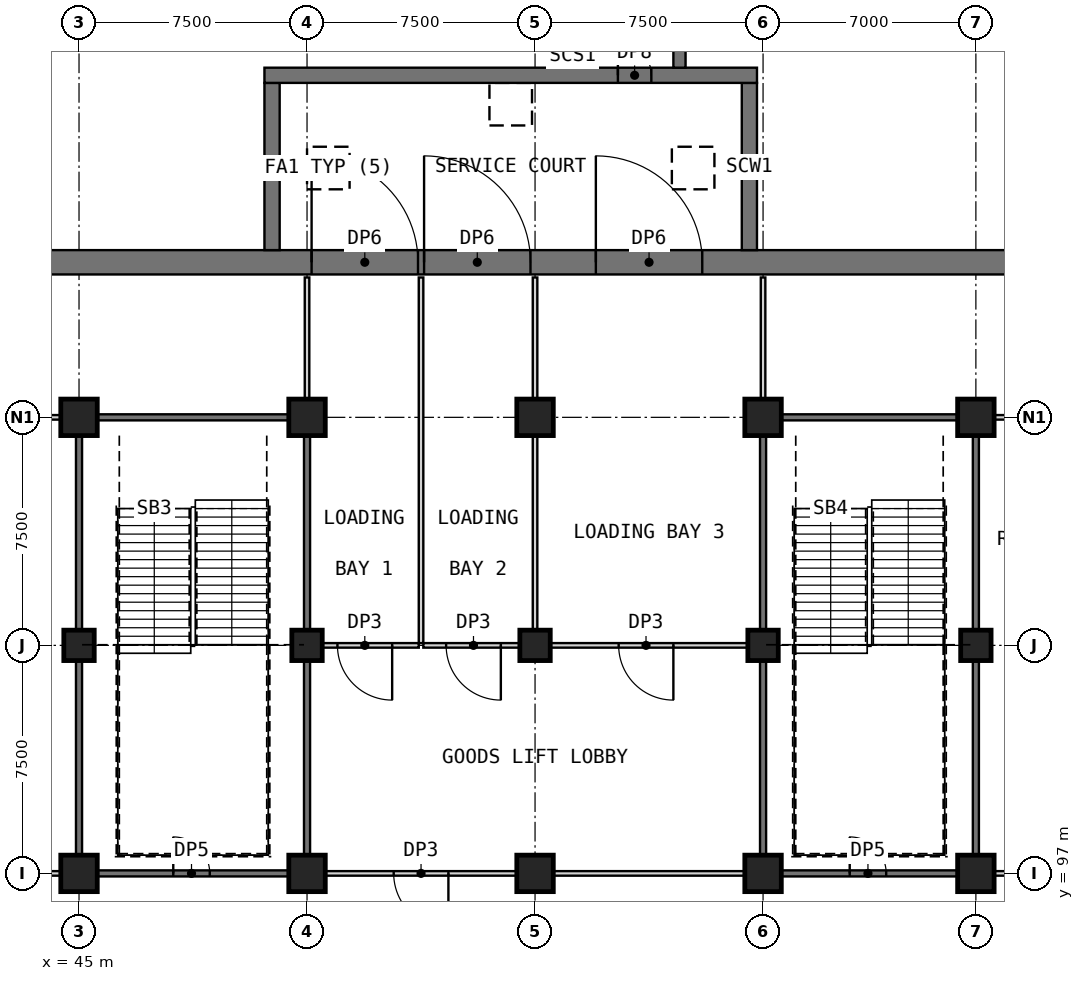
"""IFC4 building model, lengths in metres.
Left out: names, types, materials, properties, quantities, classifications, styles, units other than length and angle.
Written with IfcOpenShell. Run it as: python <this file> out.ifc"""

import sys

from ifc_helpers import new_model, si_unit, direction, frame, frame_2d, origin, origin_2d, place, context, subcontext, project, spatial, rectangle, extrude, element, fill, save


model = new_model("IFC4")
c1 = context("Model", 3, precision=1e-05, world=origin(), true_north=direction((0.0, 1.0)))
c2 = subcontext(c1, "Body", "Model", "MODEL_VIEW")
j1 = project(units=[si_unit("LENGTHUNIT", "METRE"), si_unit("PLANEANGLEUNIT", "RADIAN")], contexts=[c1])
p1 = place(None, origin())
s1 = spatial("IfcSite", under=j1, at=p1, CompositionType="ELEMENT")
p2 = place(p1, origin())
s2 = spatial("IfcBuilding", under=s1, at=p2, CompositionType="ELEMENT")
p3 = place(p2, frame((0.0, 0.0, -6.0)))
s3 = spatial("IfcBuildingStorey", under=s2, at=p3, CompositionType="ELEMENT", Elevation=-6.0)
p4 = place(p3, frame((10.4, 117.1, 0.0), z_axis=(0.0, 0.0, 1.0), x_axis=(1.0, 0.0, 0.0)))
e1 = element("IfcWall", 1, at=p4, inside=s3, PredefinedType="SHEAR", context=c2, shape_type="SweptSolid", body=[
    extrude(rectangle(XDim=80.0, YDim=0.8, at=frame_2d((40.0, 0.0))), origin(), (0.0, 0.0, 1.0), 6.0),
])
p5 = place(p4, frame((42.25, 0.0, 0.0)))
e2 = element("IfcOpeningElement", 2, at=p5, cuts=e1, PredefinedType="OPENING", context=c2, shape_type="SweptSolid", body=[
    extrude(rectangle(XDim=3.5, YDim=4.5, at=frame_2d((1.75, 2.25))), frame((0.0, 0.41, 0.0), z_axis=(0.0, -1.0, 0.0), x_axis=(1.0, 0.0, 0.0)), (0.0, 0.0, 1.0), 0.82),
])
p6 = place(p4, frame((45.95, 0.0, 0.0)))
e3 = element("IfcOpeningElement", 3, at=p6, cuts=e1, PredefinedType="OPENING", context=c2, shape_type="SweptSolid", body=[
    extrude(rectangle(XDim=3.5, YDim=4.5, at=frame_2d((1.75, 2.25))), frame((0.0, 0.41, 0.0), z_axis=(0.0, -1.0, 0.0), x_axis=(1.0, 0.0, 0.0)), (0.0, 0.0, 1.0), 0.82),
])
p7 = place(p4, frame((51.6, 0.0, 0.0)))
e4 = element("IfcOpeningElement", 4, at=p7, cuts=e1, PredefinedType="OPENING", context=c2, shape_type="SweptSolid", body=[
    extrude(rectangle(XDim=3.5, YDim=4.5, at=frame_2d((1.75, 2.25))), frame((0.0, 0.41, 0.0), z_axis=(0.0, -1.0, 0.0), x_axis=(1.0, 0.0, 0.0)), (0.0, 0.0, 1.0), 0.82),
])
p8 = place(p3, frame((45.0, 97.0, 0.0), z_axis=(0.0, 0.0, 1.0), x_axis=(1.0, 0.0, 0.0)))
e5 = element("IfcColumn", 5, at=p8, inside=s3, PredefinedType="COLUMN", context=c2, shape_type="SweptSolid", body=[
    extrude(rectangle(XDim=1.2, YDim=1.2, at=origin_2d()), origin(), (0.0, 0.0, 1.0), 6.0),
])
p9 = place(p3, frame((45.0, 104.5, 0.0), z_axis=(0.0, 0.0, 1.0), x_axis=(1.0, 0.0, 0.0)))
e6 = element("IfcColumn", 6, at=p9, inside=s3, PredefinedType="COLUMN", context=c2, shape_type="SweptSolid", body=[
    extrude(rectangle(XDim=1.0, YDim=1.0, at=origin_2d()), origin(), (0.0, 0.0, 1.0), 6.0),
])
p10 = place(p3, frame((52.5, 97.0, 0.0), z_axis=(0.0, 0.0, 1.0), x_axis=(1.0, 0.0, 0.0)))
e7 = element("IfcColumn", 7, at=p10, inside=s3, PredefinedType="COLUMN", context=c2, shape_type="SweptSolid", body=[
    extrude(rectangle(XDim=1.2, YDim=1.2, at=origin_2d()), origin(), (0.0, 0.0, 1.0), 6.0),
])
p11 = place(p3, frame((52.5, 104.5, 0.0), z_axis=(0.0, 0.0, 1.0), x_axis=(1.0, 0.0, 0.0)))
e8 = element("IfcColumn", 8, at=p11, inside=s3, PredefinedType="COLUMN", context=c2, shape_type="SweptSolid", body=[
    extrude(rectangle(XDim=1.0, YDim=1.0, at=origin_2d()), origin(), (0.0, 0.0, 1.0), 6.0),
])
p12 = place(p3, frame((60.0, 97.0, 0.0), z_axis=(0.0, 0.0, 1.0), x_axis=(1.0, 0.0, 0.0)))
e9 = element("IfcColumn", 9, at=p12, inside=s3, PredefinedType="COLUMN", context=c2, shape_type="SweptSolid", body=[
    extrude(rectangle(XDim=1.2, YDim=1.2, at=origin_2d()), origin(), (0.0, 0.0, 1.0), 6.0),
])
p13 = place(p3, frame((60.0, 104.5, 0.0), z_axis=(0.0, 0.0, 1.0), x_axis=(1.0, 0.0, 0.0)))
e10 = element("IfcColumn", 10, at=p13, inside=s3, PredefinedType="COLUMN", context=c2, shape_type="SweptSolid", body=[
    extrude(rectangle(XDim=1.0, YDim=1.0, at=origin_2d()), origin(), (0.0, 0.0, 1.0), 6.0),
])
p14 = place(p3, frame((67.5, 97.0, 0.0), z_axis=(0.0, 0.0, 1.0), x_axis=(1.0, 0.0, 0.0)))
e11 = element("IfcColumn", 11, at=p14, inside=s3, PredefinedType="COLUMN", context=c2, shape_type="SweptSolid", body=[
    extrude(rectangle(XDim=1.2, YDim=1.2, at=origin_2d()), origin(), (0.0, 0.0, 1.0), 6.0),
])
p15 = place(p3, frame((67.5, 104.5, 0.0), z_axis=(0.0, 0.0, 1.0), x_axis=(1.0, 0.0, 0.0)))
e12 = element("IfcColumn", 12, at=p15, inside=s3, PredefinedType="COLUMN", context=c2, shape_type="SweptSolid", body=[
    extrude(rectangle(XDim=1.0, YDim=1.0, at=origin_2d()), origin(), (0.0, 0.0, 1.0), 6.0),
])
p16 = place(p3, frame((74.5, 97.0, 0.0), z_axis=(0.0, 0.0, 1.0), x_axis=(1.0, 0.0, 0.0)))
e13 = element("IfcColumn", 13, at=p16, inside=s3, PredefinedType="COLUMN", context=c2, shape_type="SweptSolid", body=[
    extrude(rectangle(XDim=1.2, YDim=1.2, at=origin_2d()), origin(), (0.0, 0.0, 1.0), 6.0),
])
p17 = place(p3, frame((74.5, 104.5, 0.0), z_axis=(0.0, 0.0, 1.0), x_axis=(1.0, 0.0, 0.0)))
e14 = element("IfcColumn", 14, at=p17, inside=s3, PredefinedType="COLUMN", context=c2, shape_type="SweptSolid", body=[
    extrude(rectangle(XDim=1.0, YDim=1.0, at=origin_2d()), origin(), (0.0, 0.0, 1.0), 6.0),
])
for number, where, z_axis, x_axis in (
    (15, (45.0, 112.0, 0.0), (0.0, 0.0, 1.0), (1.0, 0.0, 0.0)),
    (16, (52.5, 112.0, 0.0), (0.0, 0.0, 1.0), (1.0, 0.0, 0.0)),
    (17, (60.0, 112.0, 0.0), (0.0, 0.0, 1.0), (1.0, 0.0, 0.0)),
    (18, (67.5, 112.0, 0.0), (0.0, 0.0, 1.0), (1.0, 0.0, 0.0)),
    (19, (74.5, 112.0, 0.0), (0.0, 0.0, 1.0), (1.0, 0.0, 0.0)),
):
    element("IfcColumn", number, at=place(p3, frame(where, z_axis=z_axis, x_axis=x_axis)), inside=s3, PredefinedType="COLUMN", context=c2, shape_type="SweptSolid", body=[
        extrude(rectangle(XDim=1.2, YDim=1.2, at=origin_2d()), origin(), (0.0, 0.0, 1.0), 6.0),
    ])
p18 = place(p3, frame((44.4, 97.0, 0.0), z_axis=(0.0, 0.0, 1.0), x_axis=(-1.0, 0.0, 0.0)))
e20 = element("IfcWall", 20, at=p18, inside=s3, PredefinedType="PARTITIONING", context=c2, shape_type="SweptSolid", body=[
    extrude(rectangle(XDim=6.3, YDim=0.15, at=frame_2d((3.15, 0.0))), origin(), (0.0, 0.0, 1.0), 5.7),
])
p19 = place(p18, frame((2.55, 0.0, 0.0)))
e21 = element("IfcOpeningElement", 21, at=p19, cuts=e20, PredefinedType="OPENING", context=c2, shape_type="SweptSolid", body=[
    extrude(rectangle(XDim=1.0, YDim=2.1, at=frame_2d((0.5, 1.05))), frame((0.0, 0.085, 0.0), z_axis=(0.0, -1.0, 0.0), x_axis=(1.0, 0.0, 0.0)), (0.0, 0.0, 1.0), 0.17),
])
p20 = place(p3, frame((45.6, 97.0, 0.0), z_axis=(0.0, 0.0, 1.0), x_axis=(1.0, 0.0, 0.0)))
e22 = element("IfcWall", 22, at=p20, inside=s3, PredefinedType="SHEAR", context=c2, shape_type="SweptSolid", body=[
    extrude(rectangle(XDim=6.3, YDim=0.2, at=frame_2d((3.15, 0.0))), origin(), (0.0, 0.0, 1.0), 5.7),
])
p21 = place(p20, frame((2.5, 0.0, 0.0)))
e23 = element("IfcOpeningElement", 23, at=p21, cuts=e22, PredefinedType="OPENING", context=c2, shape_type="SweptSolid", body=[
    extrude(rectangle(XDim=1.2, YDim=2.1, at=frame_2d((0.6, 1.05))), frame((0.0, 0.11, 0.0), z_axis=(0.0, -1.0, 0.0), x_axis=(1.0, 0.0, 0.0)), (0.0, 0.0, 1.0), 0.22),
])
p22 = place(p3, frame((59.4, 97.0, 0.0), z_axis=(0.0, 0.0, 1.0), x_axis=(-1.0, 0.0, 0.0)))
e24 = element("IfcWall", 24, at=p22, inside=s3, PredefinedType="PARTITIONING", context=c2, shape_type="SweptSolid", body=[
    extrude(rectangle(XDim=6.3, YDim=0.15, at=frame_2d((3.15, 0.0))), origin(), (0.0, 0.0, 1.0), 5.7),
])
p23 = place(p22, frame((2.25, 0.0, 0.0)))
e25 = element("IfcOpeningElement", 25, at=p23, cuts=e24, PredefinedType="OPENING", context=c2, shape_type="SweptSolid", body=[
    extrude(rectangle(XDim=1.8, YDim=2.4, at=frame_2d((0.9, 1.2))), frame((0.0, 0.085, 0.0), z_axis=(0.0, -1.0, 0.0), x_axis=(1.0, 0.0, 0.0)), (0.0, 0.0, 1.0), 0.17),
])
p24 = place(p3, frame((60.6, 97.0, 0.0), z_axis=(0.0, 0.0, 1.0), x_axis=(1.0, 0.0, 0.0)))
e26 = element("IfcWall", 26, at=p24, inside=s3, PredefinedType="PARTITIONING", context=c2, shape_type="SweptSolid", body=[
    extrude(rectangle(XDim=6.3, YDim=0.15, at=frame_2d((3.15, 0.0))), origin(), (0.0, 0.0, 1.0), 5.7),
])
p25 = place(p3, frame((68.1, 97.0, 0.0), z_axis=(0.0, 0.0, 1.0), x_axis=(1.0, 0.0, 0.0)))
e27 = element("IfcWall", 27, at=p25, inside=s3, PredefinedType="SHEAR", context=c2, shape_type="SweptSolid", body=[
    extrude(rectangle(XDim=5.8, YDim=0.2, at=frame_2d((2.9, 0.0))), origin(), (0.0, 0.0, 1.0), 5.7),
])
p26 = place(p25, frame((2.25, 0.0, 0.0)))
e28 = element("IfcOpeningElement", 28, at=p26, cuts=e27, PredefinedType="OPENING", context=c2, shape_type="SweptSolid", body=[
    extrude(rectangle(XDim=1.2, YDim=2.1, at=frame_2d((0.6, 1.05))), frame((0.0, 0.11, 0.0), z_axis=(0.0, -1.0, 0.0), x_axis=(1.0, 0.0, 0.0)), (0.0, 0.0, 1.0), 0.22),
])
p27 = place(p3, frame((81.4, 97.0, 0.0), z_axis=(0.0, 0.0, 1.0), x_axis=(-1.0, 0.0, 0.0)))
e29 = element("IfcWall", 29, at=p27, inside=s3, PredefinedType="PARTITIONING", context=c2, shape_type="SweptSolid", body=[
    extrude(rectangle(XDim=6.3, YDim=0.15, at=frame_2d((3.15, 0.0))), origin(), (0.0, 0.0, 1.0), 5.7),
])
p28 = place(p27, frame((2.55, 0.0, 0.0)))
e30 = element("IfcOpeningElement", 30, at=p28, cuts=e29, PredefinedType="OPENING", context=c2, shape_type="SweptSolid", body=[
    extrude(rectangle(XDim=1.0, YDim=2.1, at=frame_2d((0.5, 1.05))), frame((0.0, 0.085, 0.0), z_axis=(0.0, -1.0, 0.0), x_axis=(1.0, 0.0, 0.0)), (0.0, 0.0, 1.0), 0.17),
])
p29 = place(p3, frame((38.1, 112.0, 0.0), z_axis=(0.0, 0.0, 1.0), x_axis=(1.0, 0.0, 0.0)))
e31 = element("IfcWall", 31, at=p29, inside=s3, PredefinedType="PARTITIONING", context=c2, shape_type="SweptSolid", body=[
    extrude(rectangle(XDim=6.3, YDim=0.15, at=frame_2d((3.15, 0.0))), origin(), (0.0, 0.0, 1.0), 5.1),
])
p30 = place(p3, frame((45.6, 112.0, 0.0), z_axis=(0.0, 0.0, 1.0), x_axis=(1.0, 0.0, 0.0)))
e32 = element("IfcWall", 32, at=p30, inside=s3, PredefinedType="SHEAR", context=c2, shape_type="SweptSolid", body=[
    extrude(rectangle(XDim=6.3, YDim=0.2, at=frame_2d((3.15, 0.0))), origin(), (0.0, 0.0, 1.0), 5.1),
])
p31 = place(p3, frame((68.1, 112.0, 0.0), z_axis=(0.0, 0.0, 1.0), x_axis=(1.0, 0.0, 0.0)))
e33 = element("IfcWall", 33, at=p31, inside=s3, PredefinedType="SHEAR", context=c2, shape_type="SweptSolid", body=[
    extrude(rectangle(XDim=5.8, YDim=0.2, at=frame_2d((2.9, 0.0))), origin(), (0.0, 0.0, 1.0), 5.1),
])
p32 = place(p3, frame((75.1, 112.0, 0.0), z_axis=(0.0, 0.0, 1.0), x_axis=(1.0, 0.0, 0.0)))
e34 = element("IfcWall", 34, at=p32, inside=s3, PredefinedType="PARTITIONING", context=c2, shape_type="SweptSolid", body=[
    extrude(rectangle(XDim=6.3, YDim=0.15, at=frame_2d((3.15, 0.0))), origin(), (0.0, 0.0, 1.0), 5.1),
])
p33 = place(p3, frame((56.175, 104.5, 0.0), z_axis=(0.0, 0.0, 1.0), x_axis=(-1.0, 0.0, 0.0)))
e35 = element("IfcWall", 35, at=p33, inside=s3, PredefinedType="PARTITIONING", context=c2, shape_type="SweptSolid", body=[
    extrude(rectangle(XDim=3.175, YDim=0.15, at=frame_2d((1.587, 0.0))), origin(), (0.0, 0.0, 1.0), 5.7),
])
p34 = place(p33, frame((0.875, 0.0, 0.0)))
e36 = element("IfcOpeningElement", 36, at=p34, cuts=e35, PredefinedType="OPENING", context=c2, shape_type="SweptSolid", body=[
    extrude(rectangle(XDim=1.8, YDim=2.4, at=frame_2d((0.9, 1.2))), frame((0.0, 0.085, 0.0), z_axis=(0.0, -1.0, 0.0), x_axis=(1.0, 0.0, 0.0)), (0.0, 0.0, 1.0), 0.17),
])
p35 = place(p3, frame((59.5, 104.5, 0.0), z_axis=(0.0, 0.0, 1.0), x_axis=(-1.0, 0.0, 0.0)))
e37 = element("IfcWall", 37, at=p35, inside=s3, PredefinedType="PARTITIONING", context=c2, shape_type="SweptSolid", body=[
    extrude(rectangle(XDim=3.175, YDim=0.15, at=frame_2d((1.587, 0.0))), origin(), (0.0, 0.0, 1.0), 5.7),
])
p36 = place(p35, frame((0.625, 0.0, 0.0)))
e38 = element("IfcOpeningElement", 38, at=p36, cuts=e37, PredefinedType="OPENING", context=c2, shape_type="SweptSolid", body=[
    extrude(rectangle(XDim=1.8, YDim=2.4, at=frame_2d((0.9, 1.2))), frame((0.0, 0.085, 0.0), z_axis=(0.0, -1.0, 0.0), x_axis=(1.0, 0.0, 0.0)), (0.0, 0.0, 1.0), 0.17),
])
p37 = place(p3, frame((67.0, 104.5, 0.0), z_axis=(0.0, 0.0, 1.0), x_axis=(-1.0, 0.0, 0.0)))
e39 = element("IfcWall", 39, at=p37, inside=s3, PredefinedType="PARTITIONING", context=c2, shape_type="SweptSolid", body=[
    extrude(rectangle(XDim=6.5, YDim=0.15, at=frame_2d((3.25, 0.0))), origin(), (0.0, 0.0, 1.0), 5.7),
])
p38 = place(p37, frame((2.45, 0.0, 0.0)))
e40 = element("IfcOpeningElement", 40, at=p38, cuts=e39, PredefinedType="OPENING", context=c2, shape_type="SweptSolid", body=[
    extrude(rectangle(XDim=1.8, YDim=2.4, at=frame_2d((0.9, 1.2))), frame((0.0, 0.085, 0.0), z_axis=(0.0, -1.0, 0.0), x_axis=(1.0, 0.0, 0.0)), (0.0, 0.0, 1.0), 0.17),
])
for number, where, z_axis, x_axis in (
    (41, (45.0, 97.6, 0.0), (0.0, 0.0, 1.0), (0.0, 1.0, 0.0)),
    (42, (45.0, 105.0, 0.0), (0.0, 0.0, 1.0), (0.0, 1.0, 0.0)),
    (43, (52.5, 97.6, 0.0), (0.0, 0.0, 1.0), (0.0, 1.0, 0.0)),
    (44, (52.5, 105.0, 0.0), (0.0, 0.0, 1.0), (0.0, 1.0, 0.0)),
):
    element("IfcWall", number, at=place(p3, frame(where, z_axis=z_axis, x_axis=x_axis)), inside=s3, PredefinedType="SHEAR", context=c2, shape_type="SweptSolid", body=[
        extrude(rectangle(XDim=6.4, YDim=0.2, at=frame_2d((3.2, 0.0))), origin(), (0.0, 0.0, 1.0), 5.7),
    ])
p39 = place(p3, frame((52.5, 112.6, 0.0), z_axis=(0.0, 0.0, 1.0), x_axis=(0.0, 1.0, 0.0)))
e45 = element("IfcWall", 45, at=p39, inside=s3, PredefinedType="PARTITIONING", context=c2, shape_type="SweptSolid", body=[
    extrude(rectangle(XDim=4.0, YDim=0.15, at=frame_2d((2.0, 0.0))), origin(), (0.0, 0.0, 1.0), 5.7),
])
for number, where, z_axis, x_axis in (
    (46, (67.5, 97.6, 0.0), (0.0, 0.0, 1.0), (0.0, 1.0, 0.0)),
    (47, (67.5, 105.0, 0.0), (0.0, 0.0, 1.0), (0.0, 1.0, 0.0)),
):
    element("IfcWall", number, at=place(p3, frame(where, z_axis=z_axis, x_axis=x_axis)), inside=s3, PredefinedType="SHEAR", context=c2, shape_type="SweptSolid", body=[
        extrude(rectangle(XDim=6.4, YDim=0.2, at=frame_2d((3.2, 0.0))), origin(), (0.0, 0.0, 1.0), 5.7),
    ])
p40 = place(p3, frame((67.5, 112.6, 0.0), z_axis=(0.0, 0.0, 1.0), x_axis=(0.0, 1.0, 0.0)))
e48 = element("IfcWall", 48, at=p40, inside=s3, PredefinedType="PARTITIONING", context=c2, shape_type="SweptSolid", body=[
    extrude(rectangle(XDim=4.0, YDim=0.15, at=frame_2d((2.0, 0.0))), origin(), (0.0, 0.0, 1.0), 5.7),
])
for number, where, z_axis, x_axis in (
    (49, (74.5, 97.6, 0.0), (0.0, 0.0, 1.0), (0.0, 1.0, 0.0)),
    (50, (74.5, 105.0, 0.0), (0.0, 0.0, 1.0), (0.0, 1.0, 0.0)),
):
    element("IfcWall", number, at=place(p3, frame(where, z_axis=z_axis, x_axis=x_axis)), inside=s3, PredefinedType="SHEAR", context=c2, shape_type="SweptSolid", body=[
        extrude(rectangle(XDim=6.4, YDim=0.2, at=frame_2d((3.2, 0.0))), origin(), (0.0, 0.0, 1.0), 5.7),
    ])
p41 = place(p3, frame((60.0, 105.0, 0.0), z_axis=(0.0, 0.0, 1.0), x_axis=(0.0, 1.0, 0.0)))
e51 = element("IfcWall", 51, at=p41, inside=s3, PredefinedType="PARTITIONING", context=c2, shape_type="SweptSolid", body=[
    extrude(rectangle(XDim=6.4, YDim=0.15, at=frame_2d((3.2, 0.0))), origin(), (0.0, 0.0, 1.0), 5.7),
])
p42 = place(p3, frame((60.0, 112.6, 0.0), z_axis=(0.0, 0.0, 1.0), x_axis=(0.0, 1.0, 0.0)))
e52 = element("IfcWall", 52, at=p42, inside=s3, PredefinedType="PARTITIONING", context=c2, shape_type="SweptSolid", body=[
    extrude(rectangle(XDim=4.0, YDim=0.15, at=frame_2d((2.0, 0.0))), origin(), (0.0, 0.0, 1.0), 5.7),
])
p43 = place(p3, frame((56.25, 104.575, 0.0), z_axis=(0.0, 0.0, 1.0), x_axis=(0.0, 1.0, 0.0)))
e53 = element("IfcWall", 53, at=p43, inside=s3, PredefinedType="PARTITIONING", context=c2, shape_type="SweptSolid", body=[
    extrude(rectangle(XDim=12.025, YDim=0.15, at=frame_2d((6.013, 0.0))), origin(), (0.0, 0.0, 1.0), 5.1),
])
for number, where, z_axis, x_axis in (
    (54, (51.35, 117.5, 0.0), (0.0, 0.0, 1.0), (0.0, 1.0, 0.0)),
    (55, (67.05, 117.5, 0.0), (0.0, 0.0, 1.0), (0.0, 1.0, 0.0)),
):
    element("IfcWall", number, at=place(p3, frame(where, z_axis=z_axis, x_axis=x_axis)), inside=s3, PredefinedType="SHEAR", context=c2, shape_type="SweptSolid", body=[
        extrude(rectangle(XDim=5.5, YDim=0.5, at=frame_2d((2.75, 0.0))), origin(), (0.0, 0.0, 1.0), 6.0),
    ])
p44 = place(p3, frame((51.1, 123.25, 0.0), z_axis=(0.0, 0.0, 1.0), x_axis=(1.0, 0.0, 0.0)))
e56 = element("IfcWall", 56, at=p44, inside=s3, PredefinedType="SHEAR", context=c2, shape_type="SweptSolid", body=[
    extrude(rectangle(XDim=16.2, YDim=0.5, at=frame_2d((8.1, 0.0))), origin(), (0.0, 0.0, 1.0), 6.0),
])
p45 = place(p44, frame((11.625, 0.0, 0.0)))
e57 = element("IfcOpeningElement", 57, at=p45, cuts=e56, PredefinedType="OPENING", context=c2, shape_type="SweptSolid", body=[
    extrude(rectangle(XDim=1.1, YDim=2.1, at=frame_2d((0.55, 1.05))), frame((0.0, 0.26, 0.0), z_axis=(0.0, -1.0, 0.0), x_axis=(1.0, 0.0, 0.0)), (0.0, 0.0, 1.0), 0.52),
])
for number, where, z_axis, x_axis in (
    (58, (61.8, 123.5, 0.0), (0.0, 0.0, 1.0), (0.0, 1.0, 0.0)),
    (59, (64.75, 123.5, 0.0), (0.0, 0.0, 1.0), (0.0, 1.0, 0.0)),
):
    element("IfcWall", number, at=place(p3, frame(where, z_axis=z_axis, x_axis=x_axis)), inside=s3, PredefinedType="SHEAR", context=c2, shape_type="SweptSolid", body=[
        extrude(rectangle(XDim=7.56, YDim=0.4, at=frame_2d((3.78, 0.0))), origin(), (0.0, 0.0, 1.0), 6.0),
    ])
p46 = place(p21, origin())
e60 = element("IfcDoor", 60, at=p46, inside=s3, OperationType="SINGLE_SWING_LEFT", PredefinedType="DOOR", context=c2, shape_type="SweptSolid", body=[
    extrude(rectangle(XDim=1.2, YDim=2.1, at=frame_2d((0.6, 1.05))), frame((0.0, 0.025, 0.0), z_axis=(0.0, -1.0, 0.0), x_axis=(1.0, 0.0, 0.0)), (0.0, 0.0, 1.0), 0.05),
])
fill(e23, e60)
p47 = place(p23, origin())
e61 = element("IfcDoor", 61, at=p47, inside=s3, OperationType="SINGLE_SWING_LEFT", PredefinedType="DOOR", context=c2, shape_type="SweptSolid", body=[
    extrude(rectangle(XDim=1.8, YDim=2.4, at=frame_2d((0.9, 1.2))), frame((0.0, 0.025, 0.0), z_axis=(0.0, -1.0, 0.0), x_axis=(1.0, 0.0, 0.0)), (0.0, 0.0, 1.0), 0.05),
])
fill(e25, e61)
p48 = place(p26, origin())
e62 = element("IfcDoor", 62, at=p48, inside=s3, OperationType="SINGLE_SWING_LEFT", PredefinedType="DOOR", context=c2, shape_type="SweptSolid", body=[
    extrude(rectangle(XDim=1.2, YDim=2.1, at=frame_2d((0.6, 1.05))), frame((0.0, 0.025, 0.0), z_axis=(0.0, -1.0, 0.0), x_axis=(1.0, 0.0, 0.0)), (0.0, 0.0, 1.0), 0.05),
])
fill(e28, e62)
p49 = place(p34, origin())
e63 = element("IfcDoor", 63, at=p49, inside=s3, OperationType="SINGLE_SWING_LEFT", PredefinedType="DOOR", context=c2, shape_type="SweptSolid", body=[
    extrude(rectangle(XDim=1.8, YDim=2.4, at=frame_2d((0.9, 1.2))), frame((0.0, 0.025, 0.0), z_axis=(0.0, -1.0, 0.0), x_axis=(1.0, 0.0, 0.0)), (0.0, 0.0, 1.0), 0.05),
])
fill(e36, e63)
p50 = place(p36, origin())
e64 = element("IfcDoor", 64, at=p50, inside=s3, OperationType="SINGLE_SWING_LEFT", PredefinedType="DOOR", context=c2, shape_type="SweptSolid", body=[
    extrude(rectangle(XDim=1.8, YDim=2.4, at=frame_2d((0.9, 1.2))), frame((0.0, 0.025, 0.0), z_axis=(0.0, -1.0, 0.0), x_axis=(1.0, 0.0, 0.0)), (0.0, 0.0, 1.0), 0.05),
])
fill(e38, e64)
p51 = place(p38, origin())
e65 = element("IfcDoor", 65, at=p51, inside=s3, OperationType="SINGLE_SWING_LEFT", PredefinedType="DOOR", context=c2, shape_type="SweptSolid", body=[
    extrude(rectangle(XDim=1.8, YDim=2.4, at=frame_2d((0.9, 1.2))), frame((0.0, 0.025, 0.0), z_axis=(0.0, -1.0, 0.0), x_axis=(1.0, 0.0, 0.0)), (0.0, 0.0, 1.0), 0.05),
])
fill(e40, e65)
p52 = place(p5, origin())
e66 = element("IfcDoor", 66, at=p52, inside=s3, OperationType="SINGLE_SWING_LEFT", PredefinedType="DOOR", context=c2, shape_type="SweptSolid", body=[
    extrude(rectangle(XDim=3.5, YDim=4.5, at=frame_2d((1.75, 2.25))), frame((0.0, 0.025, 0.0), z_axis=(0.0, -1.0, 0.0), x_axis=(1.0, 0.0, 0.0)), (0.0, 0.0, 1.0), 0.05),
])
fill(e2, e66)
p53 = place(p6, origin())
e67 = element("IfcDoor", 67, at=p53, inside=s3, OperationType="SINGLE_SWING_LEFT", PredefinedType="DOOR", context=c2, shape_type="SweptSolid", body=[
    extrude(rectangle(XDim=3.5, YDim=4.5, at=frame_2d((1.75, 2.25))), frame((0.0, 0.025, 0.0), z_axis=(0.0, -1.0, 0.0), x_axis=(1.0, 0.0, 0.0)), (0.0, 0.0, 1.0), 0.05),
])
fill(e3, e67)
p54 = place(p7, origin())
e68 = element("IfcDoor", 68, at=p54, inside=s3, OperationType="SINGLE_SWING_LEFT", PredefinedType="DOOR", context=c2, shape_type="SweptSolid", body=[
    extrude(rectangle(XDim=3.5, YDim=4.5, at=frame_2d((1.75, 2.25))), frame((0.0, 0.025, 0.0), z_axis=(0.0, -1.0, 0.0), x_axis=(1.0, 0.0, 0.0)), (0.0, 0.0, 1.0), 0.05),
])
fill(e4, e68)
p55 = place(p45, origin())
e69 = element("IfcDoor", 69, at=p55, inside=s3, OperationType="SINGLE_SWING_LEFT", PredefinedType="DOOR", context=c2, shape_type="SweptSolid", body=[
    extrude(rectangle(XDim=1.1, YDim=2.1, at=frame_2d((0.55, 1.05))), frame((0.0, 0.025, 0.0), z_axis=(0.0, -1.0, 0.0), x_axis=(1.0, 0.0, 0.0)), (0.0, 0.0, 1.0), 0.05),
])
fill(e57, e69)
save(model, sys.argv[1])
